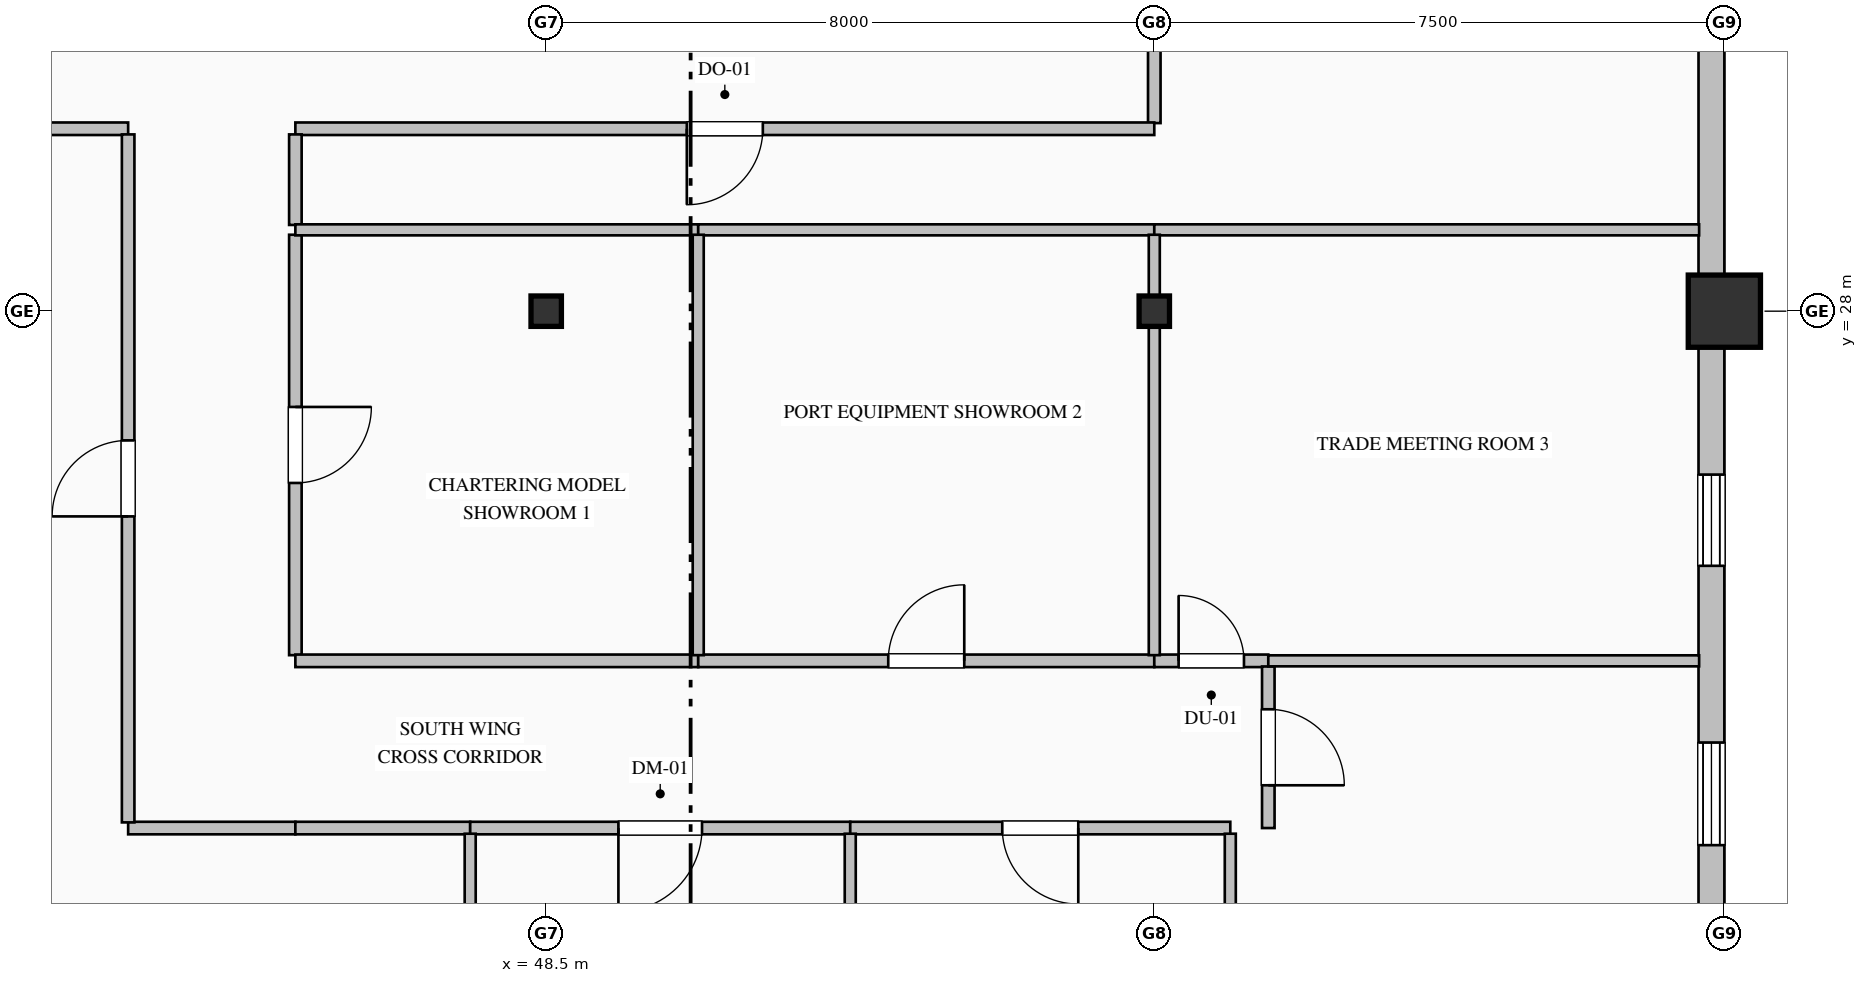
"""IFC4 building model, lengths in metres.
Left out: names, types, materials, properties, quantities, classifications, styles, units other than length and angle.
Written with IfcOpenShell. Run it as: python <this file> out.ifc"""

import sys

from ifc_helpers import new_model, si_unit, direction, frame, frame_2d, origin, origin_2d, place, context, subcontext, project, spatial, rectangle, hollow_rectangle, i_section, extrude, element, fill, save


model = new_model("IFC4")
c1 = context("Model", 3, precision=1e-05, world=origin(), true_north=direction((0.0, 1.0)))
c2 = subcontext(c1, "Body", "Model", "MODEL_VIEW")
j1 = project(units=[si_unit("LENGTHUNIT", "METRE"), si_unit("PLANEANGLEUNIT", "RADIAN")], contexts=[c1])
p1 = place(None, origin())
s1 = spatial("IfcSite", under=j1, at=p1, CompositionType="ELEMENT")
p2 = place(p1, origin())
s2 = spatial("IfcBuilding", under=s1, at=p2, CompositionType="ELEMENT")
p3 = place(p2, frame((0.0, 0.0, 265.8)))
s3 = spatial("IfcBuildingStorey", under=s2, at=p3, CompositionType="ELEMENT", Elevation=265.8)
for number, where, z_axis, x_axis in (
    (1, (48.5, 28.0, 0.0), (0.0, 0.0, 1.0), (1.0, 0.0, 0.0)),
    (2, (56.5, 28.0, 0.0), (0.0, 0.0, 1.0), (1.0, 0.0, 0.0)),
):
    element("IfcColumn", number, at=place(p3, frame(where, z_axis=z_axis, x_axis=x_axis)), inside=s3, PredefinedType="COLUMN", context=c2, shape_type="SweptSolid", body=[
        extrude(i_section(OverallWidth=0.4, OverallDepth=0.4, WebThickness=0.013, FlangeThickness=0.021, FilletRadius=0.022, at=origin_2d()), origin(), (0.0, 0.0, 1.0), 4.0),
    ])
p4 = place(p3, frame((64.0, 28.0, 0.0), z_axis=(0.0, 0.0, 1.0), x_axis=(1.0, 0.0, 0.0)))
e3 = element("IfcColumn", 3, at=p4, inside=s3, PredefinedType="COLUMN", context=c2, shape_type="SweptSolid", body=[
    extrude(hollow_rectangle(XDim=0.95, YDim=0.95, WallThickness=0.036, at=origin_2d()), origin(), (0.0, 0.0, 1.0), 4.0),
])
p5 = place(p3, frame((63.83, 36.05, 0.0), z_axis=(0.0, 0.0, 1.0), x_axis=(0.0, -1.0, 0.0)))
e4 = element("IfcWall", 4, at=p5, inside=s3, PredefinedType="SOLIDWALL", context=c2, shape_type="SweptSolid", body=[
    extrude(rectangle(XDim=19.55, YDim=0.34, at=frame_2d((9.775, 0.0))), origin(), (0.0, 0.0, 1.0), 3.325),
])
p6 = place(p5, frame((2.925, 0.0, 0.9)))
e5 = element("IfcOpeningElement", 5, at=p6, cuts=e4, PredefinedType="OPENING", context=c2, shape_type="SweptSolid", body=[
    extrude(rectangle(XDim=1.35, YDim=1.85, at=frame_2d((0.675, 0.925))), frame((0.0, 0.18, 0.0), z_axis=(0.0, -1.0, 0.0), x_axis=(1.0, 0.0, 0.0)), (0.0, 0.0, 1.0), 0.36),
])
p7 = place(p5, frame((10.2, 0.0, 0.9)))
e6 = element("IfcOpeningElement", 6, at=p7, cuts=e4, PredefinedType="OPENING", context=c2, shape_type="SweptSolid", body=[
    extrude(rectangle(XDim=1.2, YDim=1.85, at=frame_2d((0.6, 0.925))), frame((0.0, 0.18, 0.0), z_axis=(0.0, -1.0, 0.0), x_axis=(1.0, 0.0, 0.0)), (0.0, 0.0, 1.0), 0.36),
])
p8 = place(p5, frame((13.725, 0.0, 0.9)))
e7 = element("IfcOpeningElement", 7, at=p8, cuts=e4, PredefinedType="OPENING", context=c2, shape_type="SweptSolid", body=[
    extrude(rectangle(XDim=1.35, YDim=1.85, at=frame_2d((0.675, 0.925))), frame((0.0, 0.18, 0.0), z_axis=(0.0, -1.0, 0.0), x_axis=(1.0, 0.0, 0.0)), (0.0, 0.0, 1.0), 0.36),
])
p9 = place(p3, frame((56.5, 36.0, 0.0), z_axis=(0.0, 0.0, 1.0), x_axis=(0.0, -1.0, 0.0)))
e8 = element("IfcWall", 8, at=p9, inside=s3, PredefinedType="PARTITIONING", context=c2, shape_type="SweptSolid", body=[
    extrude(rectangle(XDim=5.525, YDim=0.165, at=frame_2d((2.763, 0.0))), origin(), (0.0, 0.0, 1.0), 3.179),
])
p10 = place(p3, frame((56.5, 30.4, 0.0), z_axis=(0.0, 0.0, 1.0), x_axis=(-1.0, 0.0, 0.0)))
e9 = element("IfcWall", 9, at=p10, inside=s3, PredefinedType="PARTITIONING", context=c2, shape_type="SweptSolid", body=[
    extrude(rectangle(XDim=11.3, YDim=0.165, at=frame_2d((5.65, 0.0))), origin(), (0.0, 0.0, 1.0), 3.775),
])
p11 = place(p10, frame((5.15, 0.0, 0.0)))
e10 = element("IfcOpeningElement", 10, at=p11, cuts=e9, PredefinedType="OPENING", context=c2, shape_type="SweptSolid", body=[
    extrude(rectangle(XDim=1.0, YDim=2.15, at=frame_2d((0.5, 1.075))), frame((0.0, 0.093, 0.0), z_axis=(0.0, -1.0, 0.0), x_axis=(1.0, 0.0, 0.0)), (0.0, 0.0, 1.0), 0.185),
])
p12 = place(p3, frame((43.0, 30.4, 0.0), z_axis=(0.0, 0.0, 1.0), x_axis=(-1.0, 0.0, 0.0)))
e11 = element("IfcWall", 11, at=p12, inside=s3, PredefinedType="PARTITIONING", context=c2, shape_type="SweptSolid", body=[
    extrude(rectangle(XDim=2.5, YDim=0.165, at=frame_2d((1.25, 0.0))), origin(), (0.0, 0.0, 1.0), 3.775),
])
p13 = place(p3, frame((45.2, 30.325, 0.0), z_axis=(0.0, 0.0, 1.0), x_axis=(0.0, -1.0, 0.0)))
e12 = element("IfcWall", 12, at=p13, inside=s3, PredefinedType="PARTITIONING", context=c2, shape_type="SweptSolid", body=[
    extrude(rectangle(XDim=1.191, YDim=0.165, at=frame_2d((0.595, 0.0))), origin(), (0.0, 0.0, 1.0), 3.775),
])
p14 = place(p3, frame((45.2, 29.006, 0.0), z_axis=(0.0, 0.0, 1.0), x_axis=(0.0, -1.0, 0.0)))
e13 = element("IfcWall", 13, at=p14, inside=s3, PredefinedType="PARTITIONING", context=c2, shape_type="SweptSolid", body=[
    extrude(rectangle(XDim=5.531, YDim=0.165, at=frame_2d((2.766, 0.0))), origin(), (0.0, 0.0, 1.0), 3.775),
])
p15 = place(p14, frame((2.265, 0.0, 0.0)))
e14 = element("IfcOpeningElement", 14, at=p15, cuts=e13, PredefinedType="OPENING", context=c2, shape_type="SweptSolid", body=[
    extrude(rectangle(XDim=1.0, YDim=2.15, at=frame_2d((0.5, 1.075))), frame((0.0, 0.093, 0.0), z_axis=(0.0, -1.0, 0.0), x_axis=(1.0, 0.0, 0.0)), (0.0, 0.0, 1.0), 0.185),
])
p16 = place(p3, frame((45.2, 21.2, 0.0), z_axis=(0.0, 0.0, 1.0), x_axis=(-1.0, 0.0, 0.0)))
e15 = element("IfcWall", 15, at=p16, inside=s3, PredefinedType="PARTITIONING", context=c2, shape_type="SweptSolid", body=[
    extrude(rectangle(XDim=2.2, YDim=0.165, at=frame_2d((1.1, 0.0))), origin(), (0.0, 0.0, 1.0), 3.775),
])
p17 = place(p3, frame((43.0, 21.274, 0.0), z_axis=(0.0, 0.0, 1.0), x_axis=(0.0, 1.0, 0.0)))
e16 = element("IfcWall", 16, at=p17, inside=s3, PredefinedType="PARTITIONING", context=c2, shape_type="SweptSolid", body=[
    extrude(rectangle(XDim=9.051, YDim=0.165, at=frame_2d((4.525, 0.0))), origin(), (0.0, 0.0, 1.0), 3.775),
])
p18 = place(p17, frame((4.025, 0.0, 0.0)))
e17 = element("IfcOpeningElement", 17, at=p18, cuts=e16, PredefinedType="OPENING", context=c2, shape_type="SweptSolid", body=[
    extrude(rectangle(XDim=1.0, YDim=2.15, at=frame_2d((0.5, 1.075))), frame((0.0, 0.093, 0.0), z_axis=(0.0, -1.0, 0.0), x_axis=(1.0, 0.0, 0.0)), (0.0, 0.0, 1.0), 0.185),
])
p19 = place(p3, frame((45.2, 23.4, 0.0), z_axis=(0.0, 0.0, 1.0), x_axis=(1.0, 0.0, 0.0)))
e18 = element("IfcWall", 18, at=p19, inside=s3, PredefinedType="PARTITIONING", context=c2, shape_type="SweptSolid", body=[
    extrude(rectangle(XDim=5.3, YDim=0.165, at=frame_2d((2.65, 0.0))), origin(), (0.0, 0.0, 1.0), 3.467),
])
p20 = place(p3, frame((50.5, 23.4, 0.0), z_axis=(0.0, 0.0, 1.0), x_axis=(1.0, 0.0, 0.0)))
e19 = element("IfcWall", 19, at=p20, inside=s3, PredefinedType="PARTITIONING", context=c2, shape_type="SweptSolid", body=[
    extrude(rectangle(XDim=6.0, YDim=0.165, at=frame_2d((3.0, 0.0))), origin(), (0.0, 0.0, 1.0), 3.467),
])
p21 = place(p20, frame((2.5, 0.0, 0.0)))
e20 = element("IfcOpeningElement", 20, at=p21, cuts=e19, PredefinedType="OPENING", context=c2, shape_type="SweptSolid", body=[
    extrude(rectangle(XDim=1.0, YDim=2.15, at=frame_2d((0.5, 1.075))), frame((0.0, 0.093, 0.0), z_axis=(0.0, -1.0, 0.0), x_axis=(1.0, 0.0, 0.0)), (0.0, 0.0, 1.0), 0.185),
])
p22 = place(p3, frame((56.5, 23.4, 0.0), z_axis=(0.0, 0.0, 1.0), x_axis=(1.0, 0.0, 0.0)))
e21 = element("IfcWall", 21, at=p22, inside=s3, PredefinedType="PARTITIONING", context=c2, shape_type="SweptSolid", body=[
    extrude(rectangle(XDim=1.5, YDim=0.165, at=frame_2d((0.75, 0.0))), origin(), (0.0, 0.0, 1.0), 3.775),
])
p23 = place(p22, frame((0.32, 0.0, 0.0)))
e22 = element("IfcOpeningElement", 22, at=p23, cuts=e21, PredefinedType="OPENING", context=c2, shape_type="SweptSolid", body=[
    extrude(rectangle(XDim=0.86, YDim=2.1, at=frame_2d((0.43, 1.05))), frame((0.0, 0.093, 0.0), z_axis=(0.0, -1.0, 0.0), x_axis=(1.0, 0.0, 0.0)), (0.0, 0.0, 1.0), 0.185),
])
p24 = place(p3, frame((47.5, 21.2, 0.0), z_axis=(0.0, 0.0, 1.0), x_axis=(-1.0, 0.0, 0.0)))
e23 = element("IfcWall", 23, at=p24, inside=s3, PredefinedType="PARTITIONING", context=c2, shape_type="SweptSolid", body=[
    extrude(rectangle(XDim=2.3, YDim=0.165, at=frame_2d((1.15, 0.0))), origin(), (0.0, 0.0, 1.0), 3.775),
])
p25 = place(p3, frame((52.5, 21.2, 0.0), z_axis=(0.0, 0.0, 1.0), x_axis=(-1.0, 0.0, 0.0)))
e24 = element("IfcWall", 24, at=p25, inside=s3, PredefinedType="PARTITIONING", context=c2, shape_type="SweptSolid", body=[
    extrude(rectangle(XDim=5.0, YDim=0.165, at=frame_2d((2.5, 0.0))), origin(), (0.0, 0.0, 1.0), 3.775),
])
p26 = place(p25, frame((1.95, 0.0, 0.0)))
e25 = element("IfcOpeningElement", 25, at=p26, cuts=e24, PredefinedType="OPENING", context=c2, shape_type="SweptSolid", body=[
    extrude(rectangle(XDim=1.1, YDim=2.2, at=frame_2d((0.55, 1.1))), frame((0.0, 0.093, 0.0), z_axis=(0.0, -1.0, 0.0), x_axis=(1.0, 0.0, 0.0)), (0.0, 0.0, 1.0), 0.185),
])
p27 = place(p3, frame((57.5, 21.2, 0.0), z_axis=(0.0, 0.0, 1.0), x_axis=(-1.0, 0.0, 0.0)))
e26 = element("IfcWall", 26, at=p27, inside=s3, PredefinedType="PARTITIONING", context=c2, shape_type="SweptSolid", body=[
    extrude(rectangle(XDim=5.0, YDim=0.165, at=frame_2d((2.5, 0.0))), origin(), (0.0, 0.0, 1.0), 3.775),
])
p28 = place(p27, frame((2.0, 0.0, 0.0)))
e27 = element("IfcOpeningElement", 27, at=p28, cuts=e26, PredefinedType="OPENING", context=c2, shape_type="SweptSolid", body=[
    extrude(rectangle(XDim=1.0, YDim=2.15, at=frame_2d((0.5, 1.075))), frame((0.0, 0.093, 0.0), z_axis=(0.0, -1.0, 0.0), x_axis=(1.0, 0.0, 0.0)), (0.0, 0.0, 1.0), 0.185),
])
p29 = place(p3, frame((58.0, 23.325, 0.0), z_axis=(0.0, 0.0, 1.0), x_axis=(0.0, -1.0, 0.0)))
e28 = element("IfcWall", 28, at=p29, inside=s3, PredefinedType="PARTITIONING", context=c2, shape_type="SweptSolid", body=[
    extrude(rectangle(XDim=2.125, YDim=0.165, at=frame_2d((1.063, 0.0))), origin(), (0.0, 0.0, 1.0), 3.775),
])
p30 = place(p29, frame((0.563, 0.0, 0.0)))
e29 = element("IfcOpeningElement", 29, at=p30, cuts=e28, PredefinedType="OPENING", context=c2, shape_type="SweptSolid", body=[
    extrude(rectangle(XDim=1.0, YDim=2.15, at=frame_2d((0.5, 1.075))), frame((0.0, 0.093, 0.0), z_axis=(0.0, -1.0, 0.0), x_axis=(1.0, 0.0, 0.0)), (0.0, 0.0, 1.0), 0.185),
])
p31 = place(p3, frame((50.5, 29.07, 0.0), z_axis=(0.0, 0.0, 1.0), x_axis=(-1.0, 0.0, 0.0)))
e30 = element("IfcWall", 30, at=p31, inside=s3, PredefinedType="PARTITIONING", context=c2, shape_type="SweptSolid", body=[
    extrude(rectangle(XDim=5.3, YDim=0.145, at=frame_2d((2.65, 0.0))), origin(), (0.0, 0.0, 1.0), 3.775),
])
p32 = place(p3, frame((56.5, 29.07, 0.0), z_axis=(0.0, 0.0, 1.0), x_axis=(-1.0, 0.0, 0.0)))
e31 = element("IfcWall", 31, at=p32, inside=s3, PredefinedType="PARTITIONING", context=c2, shape_type="SweptSolid", body=[
    extrude(rectangle(XDim=6.0, YDim=0.145, at=frame_2d((3.0, 0.0))), origin(), (0.0, 0.0, 1.0), 3.775),
])
p33 = place(p3, frame((63.668, 29.07, 0.0), z_axis=(0.0, 0.0, 1.0), x_axis=(-1.0, 0.0, 0.0)))
e32 = element("IfcWall", 32, at=p33, inside=s3, PredefinedType="PARTITIONING", context=c2, shape_type="SweptSolid", body=[
    extrude(rectangle(XDim=7.168, YDim=0.145, at=frame_2d((3.584, 0.0))), origin(), (0.0, 0.0, 1.0), 3.775),
])
p34 = place(p3, frame((50.5, 29.006, 0.0), z_axis=(0.0, 0.0, 1.0), x_axis=(0.0, -1.0, 0.0)))
e33 = element("IfcWall", 33, at=p34, inside=s3, PredefinedType="PARTITIONING", context=c2, shape_type="SweptSolid", body=[
    extrude(rectangle(XDim=5.531, YDim=0.145, at=frame_2d((2.766, 0.0))), origin(), (0.0, 0.0, 1.0), 3.775),
])
p35 = place(p3, frame((56.5, 29.006, 0.0), z_axis=(0.0, 0.0, 1.0), x_axis=(0.0, -1.0, 0.0)))
e34 = element("IfcWall", 34, at=p35, inside=s3, PredefinedType="PARTITIONING", context=c2, shape_type="SweptSolid", body=[
    extrude(rectangle(XDim=5.531, YDim=0.145, at=frame_2d((2.766, 0.0))), origin(), (0.0, 0.0, 1.0), 2.967),
])
p36 = place(p3, frame((63.668, 23.4, 0.0), z_axis=(0.0, 0.0, 1.0), x_axis=(-1.0, 0.0, 0.0)))
e35 = element("IfcWall", 35, at=p36, inside=s3, PredefinedType="PARTITIONING", context=c2, shape_type="SweptSolid", body=[
    extrude(rectangle(XDim=5.668, YDim=0.145, at=frame_2d((2.834, 0.0))), origin(), (0.0, 0.0, 1.0), 3.775),
])
for number, where, z_axis, x_axis in (
    (36, (47.5, 21.125, 0.0), (0.0, 0.0, 1.0), (0.0, -1.0, 0.0)),
    (37, (52.5, 21.125, 0.0), (0.0, 0.0, 1.0), (0.0, -1.0, 0.0)),
    (38, (57.5, 21.125, 0.0), (0.0, 0.0, 1.0), (0.0, -1.0, 0.0)),
):
    element("IfcWall", number, at=place(p3, frame(where, z_axis=z_axis, x_axis=x_axis)), inside=s3, PredefinedType="PARTITIONING", context=c2, shape_type="SweptSolid", body=[
        extrude(rectangle(XDim=8.293, YDim=0.145, at=frame_2d((4.147, 0.0))), origin(), (0.0, 0.0, 1.0), 3.775),
    ])
p37 = place(p7, origin())
e39 = element("IfcWindow", 39, at=p37, inside=s3, PartitioningType="DOUBLE_PANEL_VERTICAL", PredefinedType="WINDOW", context=c2, shape_type="SweptSolid", body=[
    extrude(rectangle(XDim=1.2, YDim=1.85, at=frame_2d((0.6, 0.925))), frame((0.0, 0.15, 0.0), z_axis=(0.0, -1.0, 0.0), x_axis=(1.0, 0.0, 0.0)), (0.0, 0.0, 1.0), 0.06),
])
fill(e6, e39)
p38 = place(p8, origin())
e40 = element("IfcWindow", 40, at=p38, inside=s3, PartitioningType="DOUBLE_PANEL_VERTICAL", PredefinedType="WINDOW", context=c2, shape_type="SweptSolid", body=[
    extrude(rectangle(XDim=1.35, YDim=1.85, at=frame_2d((0.675, 0.925))), frame((0.0, 0.15, 0.0), z_axis=(0.0, -1.0, 0.0), x_axis=(1.0, 0.0, 0.0)), (0.0, 0.0, 1.0), 0.06),
])
fill(e7, e40)
p39 = place(p11, origin())
e41 = element("IfcDoor", 41, at=p39, inside=s3, OperationType="SINGLE_SWING_RIGHT", PredefinedType="DOOR", context=c2, shape_type="SweptSolid", body=[
    extrude(rectangle(XDim=1.0, YDim=2.15, at=frame_2d((0.5, 1.075))), frame((0.0, 0.025, 0.0), z_axis=(0.0, -1.0, 0.0), x_axis=(1.0, 0.0, 0.0)), (0.0, 0.0, 1.0), 0.05),
])
fill(e10, e41)
p40 = place(p15, origin())
e42 = element("IfcDoor", 42, at=p40, inside=s3, OperationType="SINGLE_SWING_LEFT", PredefinedType="DOOR", context=c2, shape_type="SweptSolid", body=[
    extrude(rectangle(XDim=1.0, YDim=2.15, at=frame_2d((0.5, 1.075))), frame((0.0, 0.025, 0.0), z_axis=(0.0, -1.0, 0.0), x_axis=(1.0, 0.0, 0.0)), (0.0, 0.0, 1.0), 0.05),
])
fill(e14, e42)
p41 = place(p21, origin())
e43 = element("IfcDoor", 43, at=p41, inside=s3, OperationType="SINGLE_SWING_RIGHT", PredefinedType="DOOR", context=c2, shape_type="SweptSolid", body=[
    extrude(rectangle(XDim=1.0, YDim=2.15, at=frame_2d((0.5, 1.075))), frame((0.0, 0.025, 0.0), z_axis=(0.0, -1.0, 0.0), x_axis=(1.0, 0.0, 0.0)), (0.0, 0.0, 1.0), 0.05),
])
fill(e20, e43)
p42 = place(p23, origin())
e44 = element("IfcDoor", 44, at=p42, inside=s3, OperationType="SINGLE_SWING_LEFT", PredefinedType="DOOR", context=c2, shape_type="SweptSolid", body=[
    extrude(rectangle(XDim=0.86, YDim=2.1, at=frame_2d((0.43, 1.05))), frame((0.0, 0.025, 0.0), z_axis=(0.0, -1.0, 0.0), x_axis=(1.0, 0.0, 0.0)), (0.0, 0.0, 1.0), 0.05),
])
fill(e22, e44)
p43 = place(p18, origin())
e45 = element("IfcDoor", 45, at=p43, inside=s3, OperationType="SINGLE_SWING_LEFT", PredefinedType="DOOR", context=c2, shape_type="SweptSolid", body=[
    extrude(rectangle(XDim=1.0, YDim=2.15, at=frame_2d((0.5, 1.075))), frame((0.0, 0.025, 0.0), z_axis=(0.0, -1.0, 0.0), x_axis=(1.0, 0.0, 0.0)), (0.0, 0.0, 1.0), 0.05),
])
fill(e17, e45)
p44 = place(p26, origin())
e46 = element("IfcDoor", 46, at=p44, inside=s3, OperationType="SINGLE_SWING_RIGHT", PredefinedType="DOOR", context=c2, shape_type="SweptSolid", body=[
    extrude(rectangle(XDim=1.1, YDim=2.2, at=frame_2d((0.55, 1.1))), frame((0.0, 0.025, 0.0), z_axis=(0.0, -1.0, 0.0), x_axis=(1.0, 0.0, 0.0)), (0.0, 0.0, 1.0), 0.05),
])
fill(e25, e46)
p45 = place(p28, origin())
e47 = element("IfcDoor", 47, at=p45, inside=s3, OperationType="SINGLE_SWING_LEFT", PredefinedType="DOOR", context=c2, shape_type="SweptSolid", body=[
    extrude(rectangle(XDim=1.0, YDim=2.15, at=frame_2d((0.5, 1.075))), frame((0.0, 0.025, 0.0), z_axis=(0.0, -1.0, 0.0), x_axis=(1.0, 0.0, 0.0)), (0.0, 0.0, 1.0), 0.05),
])
fill(e27, e47)
p46 = place(p30, origin())
e48 = element("IfcDoor", 48, at=p46, inside=s3, OperationType="SINGLE_SWING_RIGHT", PredefinedType="DOOR", context=c2, shape_type="SweptSolid", body=[
    extrude(rectangle(XDim=1.0, YDim=2.15, at=frame_2d((0.5, 1.075))), frame((0.0, 0.025, 0.0), z_axis=(0.0, -1.0, 0.0), x_axis=(1.0, 0.0, 0.0)), (0.0, 0.0, 1.0), 0.05),
])
fill(e29, e48)
save(model, sys.argv[1])
